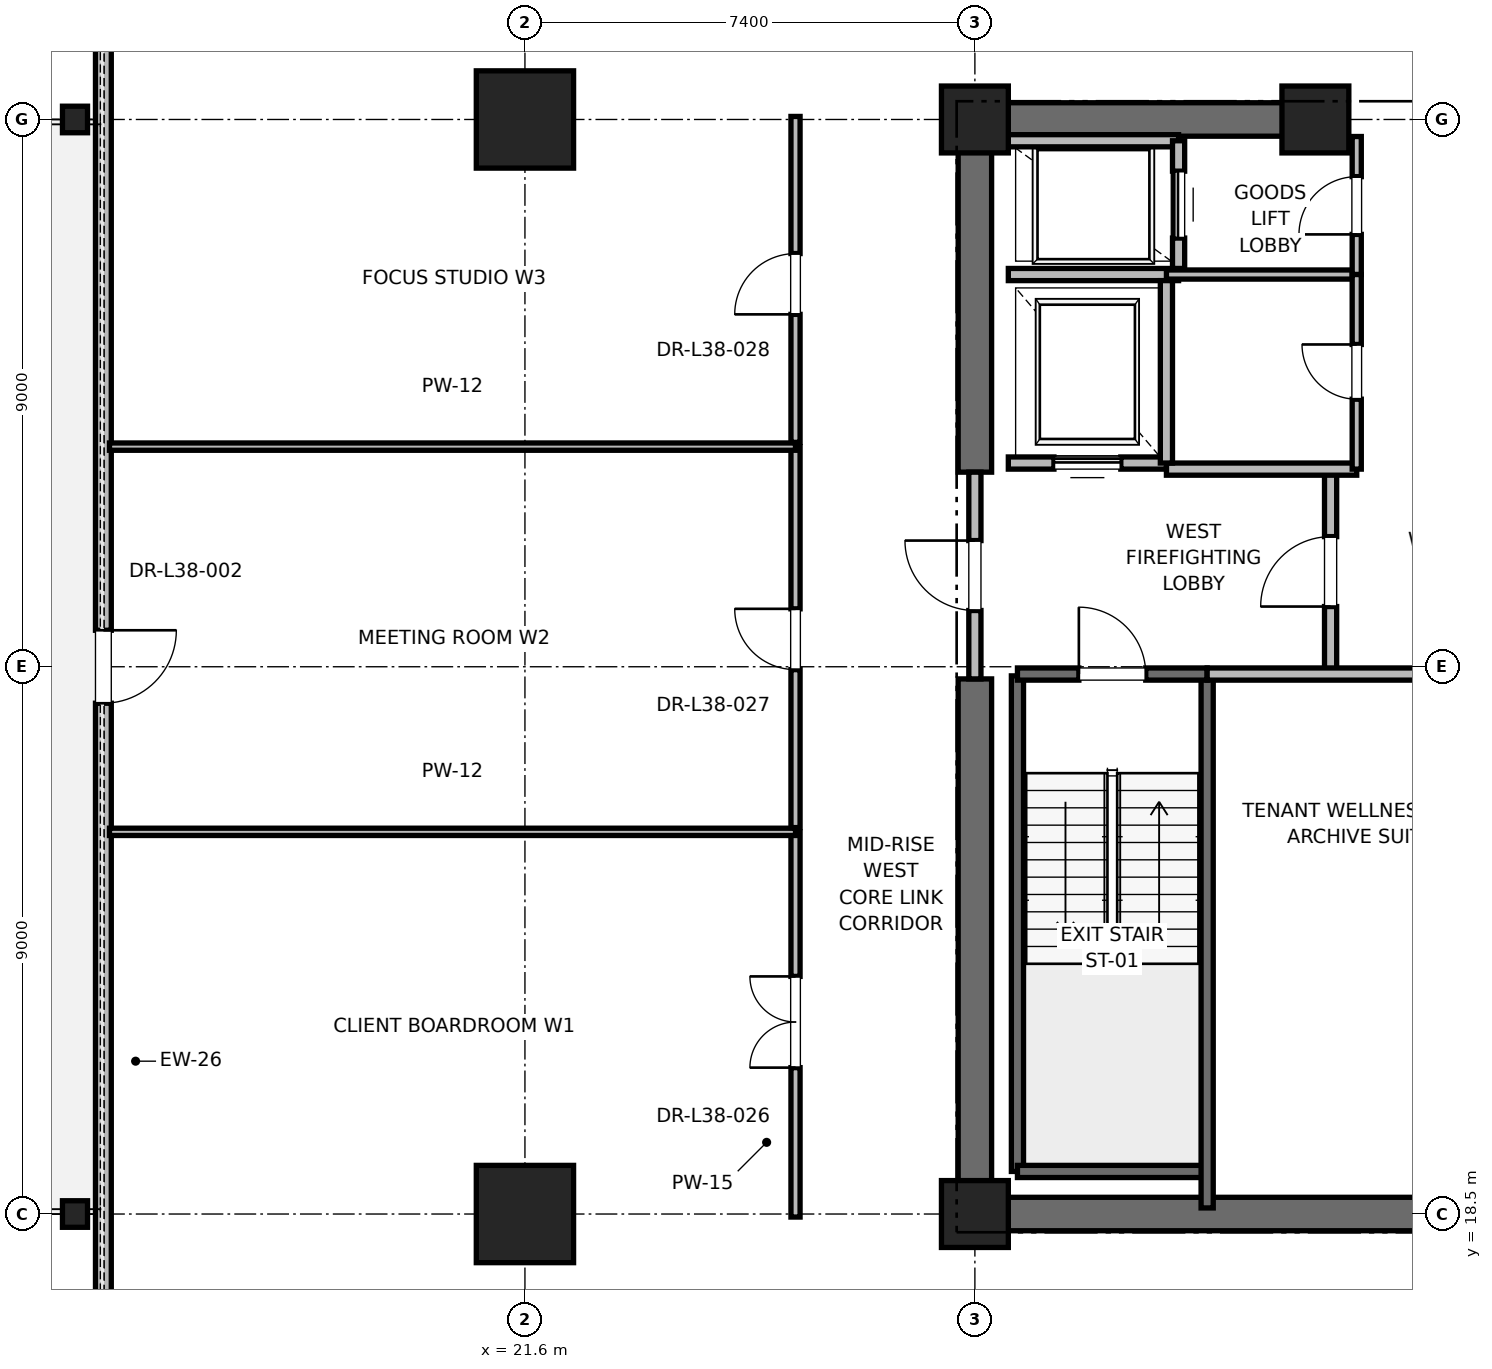
"""IFC4 building model, lengths in metres.
Left out: names, types, materials, properties, quantities, classifications, styles, units other than length and angle.
Written with IfcOpenShell. Run it as: python <this file> out.ifc"""

import sys

from ifc_helpers import new_model, si_unit, direction, frame, frame_2d, origin, origin_2d, place, context, subcontext, project, spatial, rectangle, i_section, extrude, element, fill, save


model = new_model("IFC4")
c1 = context("Model", 3, precision=1e-05, world=origin(), true_north=direction((0.0, 1.0)))
c2 = subcontext(c1, "Body", "Model", "MODEL_VIEW")
j1 = project(units=[si_unit("LENGTHUNIT", "METRE"), si_unit("PLANEANGLEUNIT", "RADIAN")], contexts=[c1])
p1 = place(None, origin())
s1 = spatial("IfcSite", under=j1, at=p1, CompositionType="ELEMENT")
p2 = place(p1, origin())
s2 = spatial("IfcBuilding", under=s1, at=p2, CompositionType="ELEMENT")
p3 = place(p2, frame((0.0, 0.0, 164.4)))
s3 = spatial("IfcBuildingStorey", under=s2, at=p3, CompositionType="ELEMENT", Elevation=164.4)
for number, where, z_axis, x_axis in (
    (1, (21.6, 18.5, 0.0), (0.0, 0.0, 1.0), (1.0, 0.0, 0.0)),
    (2, (21.6, 36.5, 0.0), (0.0, 0.0, 1.0), (1.0, 0.0, 0.0)),
):
    element("IfcColumn", number, at=place(p3, frame(where, z_axis=z_axis, x_axis=x_axis)), inside=s3, PredefinedType="COLUMN", context=c2, shape_type="SweptSolid", body=[
        extrude(rectangle(XDim=1.6, YDim=1.6, at=origin_2d()), origin(), (0.0, 0.0, 1.0), 4.0),
    ])
for number, where, z_axis, x_axis in (
    (3, (14.2, 18.5, 0.0), (0.0, 0.0, 1.0), (1.0, 0.0, 0.0)),
    (4, (14.2, 36.5, 0.0), (0.0, 0.0, 1.0), (1.0, 0.0, 0.0)),
):
    element("IfcColumn", number, at=place(p3, frame(where, z_axis=z_axis, x_axis=x_axis)), inside=s3, PredefinedType="COLUMN", context=c2, shape_type="SweptSolid", body=[
        extrude(i_section(OverallWidth=0.412, OverallDepth=0.437, WebThickness=0.036, FlangeThickness=0.058, FilletRadius=0.015, at=origin_2d()), origin(), (0.0, 0.0, 1.0), 4.0),
    ])
for number, where, z_axis, x_axis in (
    (5, (29.0, 18.5, 0.0), (0.0, 0.0, 1.0), (1.0, 0.0, 0.0)),
    (6, (29.0, 36.5, 0.0), (0.0, 0.0, 1.0), (1.0, 0.0, 0.0)),
    (7, (34.6, 36.5, 0.0), (0.0, 0.0, 1.0), (1.0, 0.0, 0.0)),
):
    element("IfcColumn", number, at=place(p3, frame(where, z_axis=z_axis, x_axis=x_axis)), inside=s3, PredefinedType="PILASTER", context=c2, shape_type="SweptSolid", body=[
        extrude(rectangle(XDim=1.1, YDim=1.1, at=origin_2d()), origin(), (0.0, 0.0, 1.0), 4.0),
    ])
p4 = place(p3, frame((29.0, 18.5, 0.0), z_axis=(0.0, 0.0, 1.0), x_axis=(1.0, 0.0, 0.0)))
e8 = element("IfcWall", 8, at=p4, inside=s3, PredefinedType="SHEAR", context=c2, shape_type="SweptSolid", body=[
    extrude(rectangle(XDim=9.2, YDim=0.55, at=frame_2d((4.6, 0.0))), origin(), (0.0, 0.0, 1.0), 3.775),
])
p5 = place(p3, frame((29.0, 36.5, 0.0), z_axis=(0.0, 0.0, 1.0), x_axis=(1.0, 0.0, 0.0)))
e9 = element("IfcWall", 9, at=p5, inside=s3, PredefinedType="SHEAR", context=c2, shape_type="SweptSolid", body=[
    extrude(rectangle(XDim=5.8, YDim=0.55, at=frame_2d((2.9, 0.0))), origin(), (0.0, 0.0, 1.0), 3.775),
])
p6 = place(p3, frame((29.0, 18.5, 0.0), z_axis=(0.0, 0.0, 1.0), x_axis=(0.0, 1.0, 0.0)))
e10 = element("IfcWall", 10, at=p6, inside=s3, PredefinedType="SHEAR", context=c2, shape_type="SweptSolid", body=[
    extrude(rectangle(XDim=8.8, YDim=0.55, at=frame_2d((4.4, 0.0))), origin(), (0.0, 0.0, 1.0), 3.775),
])
p7 = place(p3, frame((29.0, 30.7, 0.0), z_axis=(0.0, 0.0, 1.0), x_axis=(0.0, 1.0, 0.0)))
e11 = element("IfcWall", 11, at=p7, inside=s3, PredefinedType="SHEAR", context=c2, shape_type="SweptSolid", body=[
    extrude(rectangle(XDim=5.8, YDim=0.55, at=frame_2d((2.9, 0.0))), origin(), (0.0, 0.0, 1.0), 3.775),
])
p8 = place(p3, frame((14.667, 46.073, 0.0), z_axis=(0.0, 0.0, 1.0), x_axis=(0.0, -1.0, 0.0)))
e12 = element("IfcWall", 12, at=p8, inside=s3, PredefinedType="PARAPET", context=c2, shape_type="SweptSolid", body=[
    extrude(rectangle(XDim=37.146, YDim=0.26, at=frame_2d((18.573, 0.0))), origin(), (0.0, 0.0, 1.0), 2.97),
])
p9 = place(p8, frame((4.2, 0.0, 0.85)))
e13 = element("IfcOpeningElement", 13, at=p9, cuts=e12, PredefinedType="OPENING", context=c2, shape_type="SweptSolid", body=[
    extrude(rectangle(XDim=2.0, YDim=2.3, at=frame_2d((1.0, 1.15))), frame((0.0, 0.13, 0.0), z_axis=(0.0, -1.0, 0.0), x_axis=(1.0, 0.0, 0.0)), (0.0, 0.0, 1.0), 0.26),
])
p10 = place(p8, frame((17.973, 0.0, 0.0)))
e14 = element("IfcOpeningElement", 14, at=p10, cuts=e12, PredefinedType="OPENING", context=c2, shape_type="SweptSolid", body=[
    extrude(rectangle(XDim=1.2, YDim=2.2, at=frame_2d((0.6, 1.1))), frame((0.0, 0.13, 0.0), z_axis=(0.0, -1.0, 0.0), x_axis=(1.0, 0.0, 0.0)), (0.0, 0.0, 1.0), 0.26),
])
p11 = place(p8, frame((30.946, 0.0, 0.85)))
e15 = element("IfcOpeningElement", 15, at=p11, cuts=e12, PredefinedType="OPENING", context=c2, shape_type="SweptSolid", body=[
    extrude(rectangle(XDim=2.0, YDim=2.3, at=frame_2d((1.0, 1.15))), frame((0.0, 0.13, 0.0), z_axis=(0.0, -1.0, 0.0), x_axis=(1.0, 0.0, 0.0)), (0.0, 0.0, 1.0), 0.26),
])
p12 = place(p3, frame((29.7, 19.2, 0.0), z_axis=(0.0, 0.0, 1.0), x_axis=(0.0, 1.0, 0.0)))
e16 = element("IfcWall", 16, at=p12, inside=s3, PredefinedType="SOLIDWALL", context=c2, shape_type="SweptSolid", body=[
    extrude(rectangle(XDim=8.15, YDim=0.2, at=frame_2d((4.075, 0.0))), origin(), (0.0, 0.0, 1.0), 3.775),
])
p13 = place(p3, frame((29.7, 19.2, 0.0), z_axis=(0.0, 0.0, 1.0), x_axis=(1.0, 0.0, 0.0)))
e17 = element("IfcWall", 17, at=p13, inside=s3, PredefinedType="SOLIDWALL", context=c2, shape_type="SweptSolid", body=[
    extrude(rectangle(XDim=3.12, YDim=0.2, at=frame_2d((1.56, 0.0))), origin(), (0.0, 0.0, 1.0), 3.775),
])
p14 = place(p3, frame((32.82, 18.6, 0.0), z_axis=(0.0, 0.0, 1.0), x_axis=(0.0, 1.0, 0.0)))
e18 = element("IfcWall", 18, at=p14, inside=s3, PredefinedType="SOLIDWALL", context=c2, shape_type="SweptSolid", body=[
    extrude(rectangle(XDim=8.78, YDim=0.2, at=frame_2d((4.39, 0.0))), origin(), (0.0, 0.0, 1.0), 3.775),
])
p15 = place(p3, frame((29.7, 27.38, 0.0), z_axis=(0.0, 0.0, 1.0), x_axis=(1.0, 0.0, 0.0)))
e19 = element("IfcWall", 19, at=p15, inside=s3, PredefinedType="SOLIDWALL", context=c2, shape_type="SweptSolid", body=[
    extrude(rectangle(XDim=3.12, YDim=0.2, at=frame_2d((1.56, 0.0))), origin(), (0.0, 0.0, 1.0), 3.775),
])
p16 = place(p15, frame((1.01, 0.0, 0.0)))
e20 = element("IfcOpeningElement", 20, at=p16, cuts=e19, PredefinedType="OPENING", context=c2, shape_type="SweptSolid", body=[
    extrude(rectangle(XDim=1.1, YDim=2.15, at=frame_2d((0.55, 1.075))), frame((0.0, 0.1, 0.0), z_axis=(0.0, -1.0, 0.0), x_axis=(1.0, 0.0, 0.0)), (0.0, 0.0, 1.0), 0.2),
])
p17 = place(p3, frame((34.85, 27.38, 0.0), z_axis=(0.0, 0.0, 1.0), x_axis=(0.0, 1.0, 0.0)))
e21 = element("IfcWall", 21, at=p17, inside=s3, PredefinedType="PARTITIONING", context=c2, shape_type="SweptSolid", body=[
    extrude(rectangle(XDim=3.37, YDim=0.2, at=frame_2d((1.685, 0.0))), origin(), (0.0, 0.0, 1.0), 3.775),
])
p18 = place(p17, frame((1.11, 0.0, 0.0)))
e22 = element("IfcOpeningElement", 22, at=p18, cuts=e21, PredefinedType="OPENING", context=c2, shape_type="SweptSolid", body=[
    extrude(rectangle(XDim=1.15, YDim=2.2, at=frame_2d((0.575, 1.1))), frame((0.0, 0.1, 0.0), z_axis=(0.0, -1.0, 0.0), x_axis=(1.0, 0.0, 0.0)), (0.0, 0.0, 1.0), 0.2),
])
p19 = place(p3, frame((29.0, 27.3, 0.0), z_axis=(0.0, 0.0, 1.0), x_axis=(0.0, 1.0, 0.0)))
e23 = element("IfcWall", 23, at=p19, inside=s3, PredefinedType="PARTITIONING", context=c2, shape_type="SweptSolid", body=[
    extrude(rectangle(XDim=3.4, YDim=0.2, at=frame_2d((1.7, 0.0))), origin(), (0.0, 0.0, 1.0), 2.755),
])
p20 = place(p19, frame((1.125, 0.0, 0.0)))
e24 = element("IfcOpeningElement", 24, at=p20, cuts=e23, PredefinedType="OPENING", context=c2, shape_type="SweptSolid", body=[
    extrude(rectangle(XDim=1.15, YDim=2.2, at=frame_2d((0.575, 1.1))), frame((0.0, 0.1, 0.0), z_axis=(0.0, -1.0, 0.0), x_axis=(1.0, 0.0, 0.0)), (0.0, 0.0, 1.0), 0.2),
])
p21 = place(p3, frame((32.82, 27.38, 0.0), z_axis=(0.0, 0.0, 1.0), x_axis=(1.0, 0.0, 0.0)))
e25 = element("IfcWall", 25, at=p21, inside=s3, PredefinedType="PARTITIONING", context=c2, shape_type="SweptSolid", body=[
    extrude(rectangle(XDim=5.62, YDim=0.2, at=frame_2d((2.81, 0.0))), origin(), (0.0, 0.0, 1.0), 3.775),
])
p22 = place(p3, frame((32.15, 30.75, 0.0), z_axis=(0.0, 0.0, 1.0), x_axis=(1.0, 0.0, 0.0)))
e26 = element("IfcWall", 26, at=p22, inside=s3, PredefinedType="PARTITIONING", context=c2, shape_type="SweptSolid", body=[
    extrude(rectangle(XDim=3.13, YDim=0.2, at=frame_2d((1.565, 0.0))), origin(), (0.0, 0.0, 1.0), 3.775),
])
p23 = place(p3, frame((29.55, 30.85, 0.0), z_axis=(0.0, 0.0, 1.0), x_axis=(1.0, 0.0, 0.0)))
e27 = element("IfcWall", 27, at=p23, inside=s3, PredefinedType="SOLIDWALL", context=c2, shape_type="SweptSolid", body=[
    extrude(rectangle(XDim=2.6, YDim=0.2, at=frame_2d((1.3, 0.0))), origin(), (0.0, 0.0, 1.0), 2.755),
])
p24 = place(p23, frame((0.75, 0.0, 0.0)))
e28 = element("IfcOpeningElement", 28, at=p24, cuts=e27, PredefinedType="OPENING", context=c2, shape_type="SweptSolid", body=[
    extrude(rectangle(XDim=1.1, YDim=2.2, at=frame_2d((0.55, 1.1))), frame((0.0, 0.1, 0.0), z_axis=(0.0, -1.0, 0.0), x_axis=(1.0, 0.0, 0.0)), (0.0, 0.0, 1.0), 0.2),
])
p25 = place(p3, frame((29.55, 33.95, 0.0), z_axis=(0.0, 0.0, 1.0), x_axis=(1.0, 0.0, 0.0)))
e29 = element("IfcWall", 29, at=p25, inside=s3, PredefinedType="SOLIDWALL", context=c2, shape_type="SweptSolid", body=[
    extrude(rectangle(XDim=2.8, YDim=0.2, at=frame_2d((1.4, 0.0))), origin(), (0.0, 0.0, 1.0), 3.775),
])
p26 = place(p3, frame((32.15, 30.85, 0.0), z_axis=(0.0, 0.0, 1.0), x_axis=(0.0, 1.0, 0.0)))
e30 = element("IfcWall", 30, at=p26, inside=s3, PredefinedType="SOLIDWALL", context=c2, shape_type="SweptSolid", body=[
    extrude(rectangle(XDim=3.0, YDim=0.2, at=frame_2d((1.5, 0.0))), origin(), (0.0, 0.0, 1.0), 3.775),
])
p27 = place(p3, frame((32.35, 36.15, 0.0), z_axis=(0.0, 0.0, 1.0), x_axis=(-1.0, 0.0, 0.0)))
e31 = element("IfcWall", 31, at=p27, inside=s3, PredefinedType="SOLIDWALL", context=c2, shape_type="SweptSolid", body=[
    extrude(rectangle(XDim=2.8, YDim=0.2, at=frame_2d((1.4, 0.0))), origin(), (0.0, 0.0, 1.0), 2.985),
])
p28 = place(p3, frame((32.35, 34.05, 0.0), z_axis=(0.0, 0.0, 1.0), x_axis=(0.0, 1.0, 0.0)))
e32 = element("IfcWall", 32, at=p28, inside=s3, PredefinedType="SOLIDWALL", context=c2, shape_type="SweptSolid", body=[
    extrude(rectangle(XDim=2.1, YDim=0.2, at=frame_2d((1.05, 0.0))), origin(), (0.0, 0.0, 1.0), 3.775),
])
p29 = place(p28, frame((0.5, 0.0, 0.0)))
e33 = element("IfcOpeningElement", 33, at=p29, cuts=e32, PredefinedType="OPENING", context=c2, shape_type="SweptSolid", body=[
    extrude(rectangle(XDim=1.1, YDim=2.2, at=frame_2d((0.55, 1.1))), frame((0.0, 0.1, 0.0), z_axis=(0.0, -1.0, 0.0), x_axis=(1.0, 0.0, 0.0)), (0.0, 0.0, 1.0), 0.2),
])
p30 = place(p3, frame((32.15, 33.95, 0.0), z_axis=(0.0, 0.0, 1.0), x_axis=(1.0, 0.0, 0.0)))
e34 = element("IfcWall", 34, at=p30, inside=s3, PredefinedType="PARTITIONING", context=c2, shape_type="SweptSolid", body=[
    extrude(rectangle(XDim=3.13, YDim=0.15, at=frame_2d((1.565, 0.0))), origin(), (0.0, 0.0, 1.0), 2.85),
])
p31 = place(p3, frame((35.28, 33.95, 0.0), z_axis=(0.0, 0.0, 1.0), x_axis=(0.0, 1.0, 0.0)))
e35 = element("IfcWall", 35, at=p31, inside=s3, PredefinedType="PARTITIONING", context=c2, shape_type="SweptSolid", body=[
    extrude(rectangle(XDim=2.27, YDim=0.15, at=frame_2d((1.135, 0.0))), origin(), (0.0, 0.0, 1.0), 2.755),
])
p32 = place(p31, frame((0.66, 0.0, 0.0)))
e36 = element("IfcOpeningElement", 36, at=p32, cuts=e35, PredefinedType="OPENING", context=c2, shape_type="SweptSolid", body=[
    extrude(rectangle(XDim=0.95, YDim=2.15, at=frame_2d((0.475, 1.075))), frame((0.0, 0.075, 0.0), z_axis=(0.0, -1.0, 0.0), x_axis=(1.0, 0.0, 0.0)), (0.0, 0.0, 1.0), 0.15),
])
p33 = place(p3, frame((35.28, 30.75, 0.0), z_axis=(0.0, 0.0, 1.0), x_axis=(0.0, 1.0, 0.0)))
e37 = element("IfcWall", 37, at=p33, inside=s3, PredefinedType="PARTITIONING", context=c2, shape_type="SweptSolid", body=[
    extrude(rectangle(XDim=3.2, YDim=0.15, at=frame_2d((1.6, 0.0))), origin(), (0.0, 0.0, 1.0), 2.85),
])
p34 = place(p33, frame((1.15, 0.0, 0.0)))
e38 = element("IfcOpeningElement", 38, at=p34, cuts=e37, PredefinedType="OPENING", context=c2, shape_type="SweptSolid", body=[
    extrude(rectangle(XDim=0.9, YDim=2.1, at=frame_2d((0.45, 1.05))), frame((0.0, 0.075, 0.0), z_axis=(0.0, -1.0, 0.0), x_axis=(1.0, 0.0, 0.0)), (0.0, 0.0, 1.0), 0.15),
])
p35 = place(p3, frame((26.05, 18.45, 0.0), z_axis=(0.0, 0.0, 1.0), x_axis=(0.0, 1.0, 0.0)))
e39 = element("IfcWall", 39, at=p35, inside=s3, PredefinedType="PARTITIONING", context=c2, shape_type="SweptSolid", body=[
    extrude(rectangle(XDim=6.335, YDim=0.15, at=frame_2d((3.167, 0.0))), origin(), (0.0, 0.0, 1.0), 2.85),
])
p36 = place(p35, frame((2.458, 0.0, 0.0)))
e40 = element("IfcOpeningElement", 40, at=p36, cuts=e39, PredefinedType="OPENING", context=c2, shape_type="SweptSolid", body=[
    extrude(rectangle(XDim=1.5, YDim=2.25, at=frame_2d((0.75, 1.125))), frame((0.0, 0.075, 0.0), z_axis=(0.0, -1.0, 0.0), x_axis=(1.0, 0.0, 0.0)), (0.0, 0.0, 1.0), 0.15),
])
p37 = place(p3, frame((14.767, 24.785, 0.0), z_axis=(0.0, 0.0, 1.0), x_axis=(1.0, 0.0, 0.0)))
e41 = element("IfcWall", 41, at=p37, inside=s3, PredefinedType="PARTITIONING", context=c2, shape_type="SweptSolid", body=[
    extrude(rectangle(XDim=11.283, YDim=0.12, at=frame_2d((5.642, 0.0))), origin(), (0.0, 0.0, 1.0), 2.85),
])
p38 = place(p3, frame((26.05, 24.855, 0.0), z_axis=(0.0, 0.0, 1.0), x_axis=(0.0, 1.0, 0.0)))
e42 = element("IfcWall", 42, at=p38, inside=s3, PredefinedType="PARTITIONING", context=c2, shape_type="SweptSolid", body=[
    extrude(rectangle(XDim=6.265, YDim=0.15, at=frame_2d((3.133, 0.0))), origin(), (0.0, 0.0, 1.0), 2.85),
])
p39 = place(p38, frame((2.597, 0.0, 0.0)))
e43 = element("IfcOpeningElement", 43, at=p39, cuts=e42, PredefinedType="OPENING", context=c2, shape_type="SweptSolid", body=[
    extrude(rectangle(XDim=1.0, YDim=2.15, at=frame_2d((0.5, 1.075))), frame((0.0, 0.075, 0.0), z_axis=(0.0, -1.0, 0.0), x_axis=(1.0, 0.0, 0.0)), (0.0, 0.0, 1.0), 0.15),
])
p40 = place(p3, frame((14.767, 31.12, 0.0), z_axis=(0.0, 0.0, 1.0), x_axis=(1.0, 0.0, 0.0)))
e44 = element("IfcWall", 44, at=p40, inside=s3, PredefinedType="PARTITIONING", context=c2, shape_type="SweptSolid", body=[
    extrude(rectangle(XDim=11.283, YDim=0.12, at=frame_2d((5.642, 0.0))), origin(), (0.0, 0.0, 1.0), 2.85),
])
p41 = place(p3, frame((26.05, 31.19, 0.0), z_axis=(0.0, 0.0, 1.0), x_axis=(0.0, 1.0, 0.0)))
e45 = element("IfcWall", 45, at=p41, inside=s3, PredefinedType="PARTITIONING", context=c2, shape_type="SweptSolid", body=[
    extrude(rectangle(XDim=5.36, YDim=0.15, at=frame_2d((2.68, 0.0))), origin(), (0.0, 0.0, 1.0), 2.85),
])
p42 = place(p41, frame((2.105, 0.0, 0.0)))
e46 = element("IfcOpeningElement", 46, at=p42, cuts=e45, PredefinedType="OPENING", context=c2, shape_type="SweptSolid", body=[
    extrude(rectangle(XDim=1.0, YDim=2.15, at=frame_2d((0.5, 1.075))), frame((0.0, 0.075, 0.0), z_axis=(0.0, -1.0, 0.0), x_axis=(1.0, 0.0, 0.0)), (0.0, 0.0, 1.0), 0.15),
])
p43 = place(p10, origin())
e47 = element("IfcDoor", 47, at=p43, inside=s3, OperationType="SINGLE_SWING_LEFT", PredefinedType="DOOR", context=c2, shape_type="SweptSolid", body=[
    extrude(rectangle(XDim=1.2, YDim=2.2, at=frame_2d((0.6, 1.1))), frame((0.0, 0.025, 0.0), z_axis=(0.0, -1.0, 0.0), x_axis=(1.0, 0.0, 0.0)), (0.0, 0.0, 1.0), 0.05),
])
fill(e14, e47)
p44 = place(p16, origin())
e48 = element("IfcDoor", 48, at=p44, inside=s3, OperationType="SINGLE_SWING_LEFT", PredefinedType="DOOR", context=c2, shape_type="SweptSolid", body=[
    extrude(rectangle(XDim=1.1, YDim=2.15, at=frame_2d((0.55, 1.075))), frame((0.0, 0.025, 0.0), z_axis=(0.0, -1.0, 0.0), x_axis=(1.0, 0.0, 0.0)), (0.0, 0.0, 1.0), 0.05),
])
fill(e20, e48)
p45 = place(p18, origin())
e49 = element("IfcDoor", 49, at=p45, inside=s3, OperationType="SINGLE_SWING_LEFT", PredefinedType="DOOR", context=c2, shape_type="SweptSolid", body=[
    extrude(rectangle(XDim=1.15, YDim=2.2, at=frame_2d((0.575, 1.1))), frame((0.0, 0.025, 0.0), z_axis=(0.0, -1.0, 0.0), x_axis=(1.0, 0.0, 0.0)), (0.0, 0.0, 1.0), 0.05),
])
fill(e22, e49)
p46 = place(p20, origin())
e50 = element("IfcDoor", 50, at=p46, inside=s3, OperationType="SINGLE_SWING_RIGHT", PredefinedType="DOOR", context=c2, shape_type="SweptSolid", body=[
    extrude(rectangle(XDim=1.15, YDim=2.2, at=frame_2d((0.575, 1.1))), frame((0.0, 0.025, 0.0), z_axis=(0.0, -1.0, 0.0), x_axis=(1.0, 0.0, 0.0)), (0.0, 0.0, 1.0), 0.05),
])
fill(e24, e50)
p47 = place(p24, origin())
e51 = element("IfcDoor", 51, at=p47, inside=s3, OperationType="SLIDING_TO_RIGHT", PredefinedType="DOOR", context=c2, shape_type="SweptSolid", body=[
    extrude(rectangle(XDim=1.1, YDim=2.2, at=frame_2d((0.55, 1.1))), frame((0.0, 0.025, 0.0), z_axis=(0.0, -1.0, 0.0), x_axis=(1.0, 0.0, 0.0)), (0.0, 0.0, 1.0), 0.05),
])
fill(e28, e51)
p48 = place(p29, origin())
e52 = element("IfcDoor", 52, at=p48, inside=s3, OperationType="SLIDING_TO_RIGHT", PredefinedType="DOOR", context=c2, shape_type="SweptSolid", body=[
    extrude(rectangle(XDim=1.1, YDim=2.2, at=frame_2d((0.55, 1.1))), frame((0.0, 0.025, 0.0), z_axis=(0.0, -1.0, 0.0), x_axis=(1.0, 0.0, 0.0)), (0.0, 0.0, 1.0), 0.05),
])
fill(e33, e52)
p49 = place(p32, origin())
e53 = element("IfcDoor", 53, at=p49, inside=s3, OperationType="SINGLE_SWING_LEFT", PredefinedType="DOOR", context=c2, shape_type="SweptSolid", body=[
    extrude(rectangle(XDim=0.95, YDim=2.15, at=frame_2d((0.475, 1.075))), frame((0.0, 0.025, 0.0), z_axis=(0.0, -1.0, 0.0), x_axis=(1.0, 0.0, 0.0)), (0.0, 0.0, 1.0), 0.05),
])
fill(e36, e53)
p50 = place(p34, origin())
e54 = element("IfcDoor", 54, at=p50, inside=s3, OperationType="SINGLE_SWING_RIGHT", PredefinedType="DOOR", context=c2, shape_type="SweptSolid", body=[
    extrude(rectangle(XDim=0.9, YDim=2.1, at=frame_2d((0.45, 1.05))), frame((0.0, 0.025, 0.0), z_axis=(0.0, -1.0, 0.0), x_axis=(1.0, 0.0, 0.0)), (0.0, 0.0, 1.0), 0.05),
])
fill(e38, e54)
p51 = place(p36, origin())
e55 = element("IfcDoor", 55, at=p51, inside=s3, OperationType="DOUBLE_DOOR_SINGLE_SWING", PredefinedType="DOOR", context=c2, shape_type="SweptSolid", body=[
    extrude(rectangle(XDim=1.5, YDim=2.25, at=frame_2d((0.75, 1.125))), frame((0.0, 0.025, 0.0), z_axis=(0.0, -1.0, 0.0), x_axis=(1.0, 0.0, 0.0)), (0.0, 0.0, 1.0), 0.05),
])
fill(e40, e55)
p52 = place(p39, origin())
e56 = element("IfcDoor", 56, at=p52, inside=s3, OperationType="SINGLE_SWING_RIGHT", PredefinedType="DOOR", context=c2, shape_type="SweptSolid", body=[
    extrude(rectangle(XDim=1.0, YDim=2.15, at=frame_2d((0.5, 1.075))), frame((0.0, 0.025, 0.0), z_axis=(0.0, -1.0, 0.0), x_axis=(1.0, 0.0, 0.0)), (0.0, 0.0, 1.0), 0.05),
])
fill(e43, e56)
p53 = place(p42, origin())
e57 = element("IfcDoor", 57, at=p53, inside=s3, OperationType="SINGLE_SWING_LEFT", PredefinedType="DOOR", context=c2, shape_type="SweptSolid", body=[
    extrude(rectangle(XDim=1.0, YDim=2.15, at=frame_2d((0.5, 1.075))), frame((0.0, 0.025, 0.0), z_axis=(0.0, -1.0, 0.0), x_axis=(1.0, 0.0, 0.0)), (0.0, 0.0, 1.0), 0.05),
])
fill(e46, e57)
save(model, sys.argv[1])
